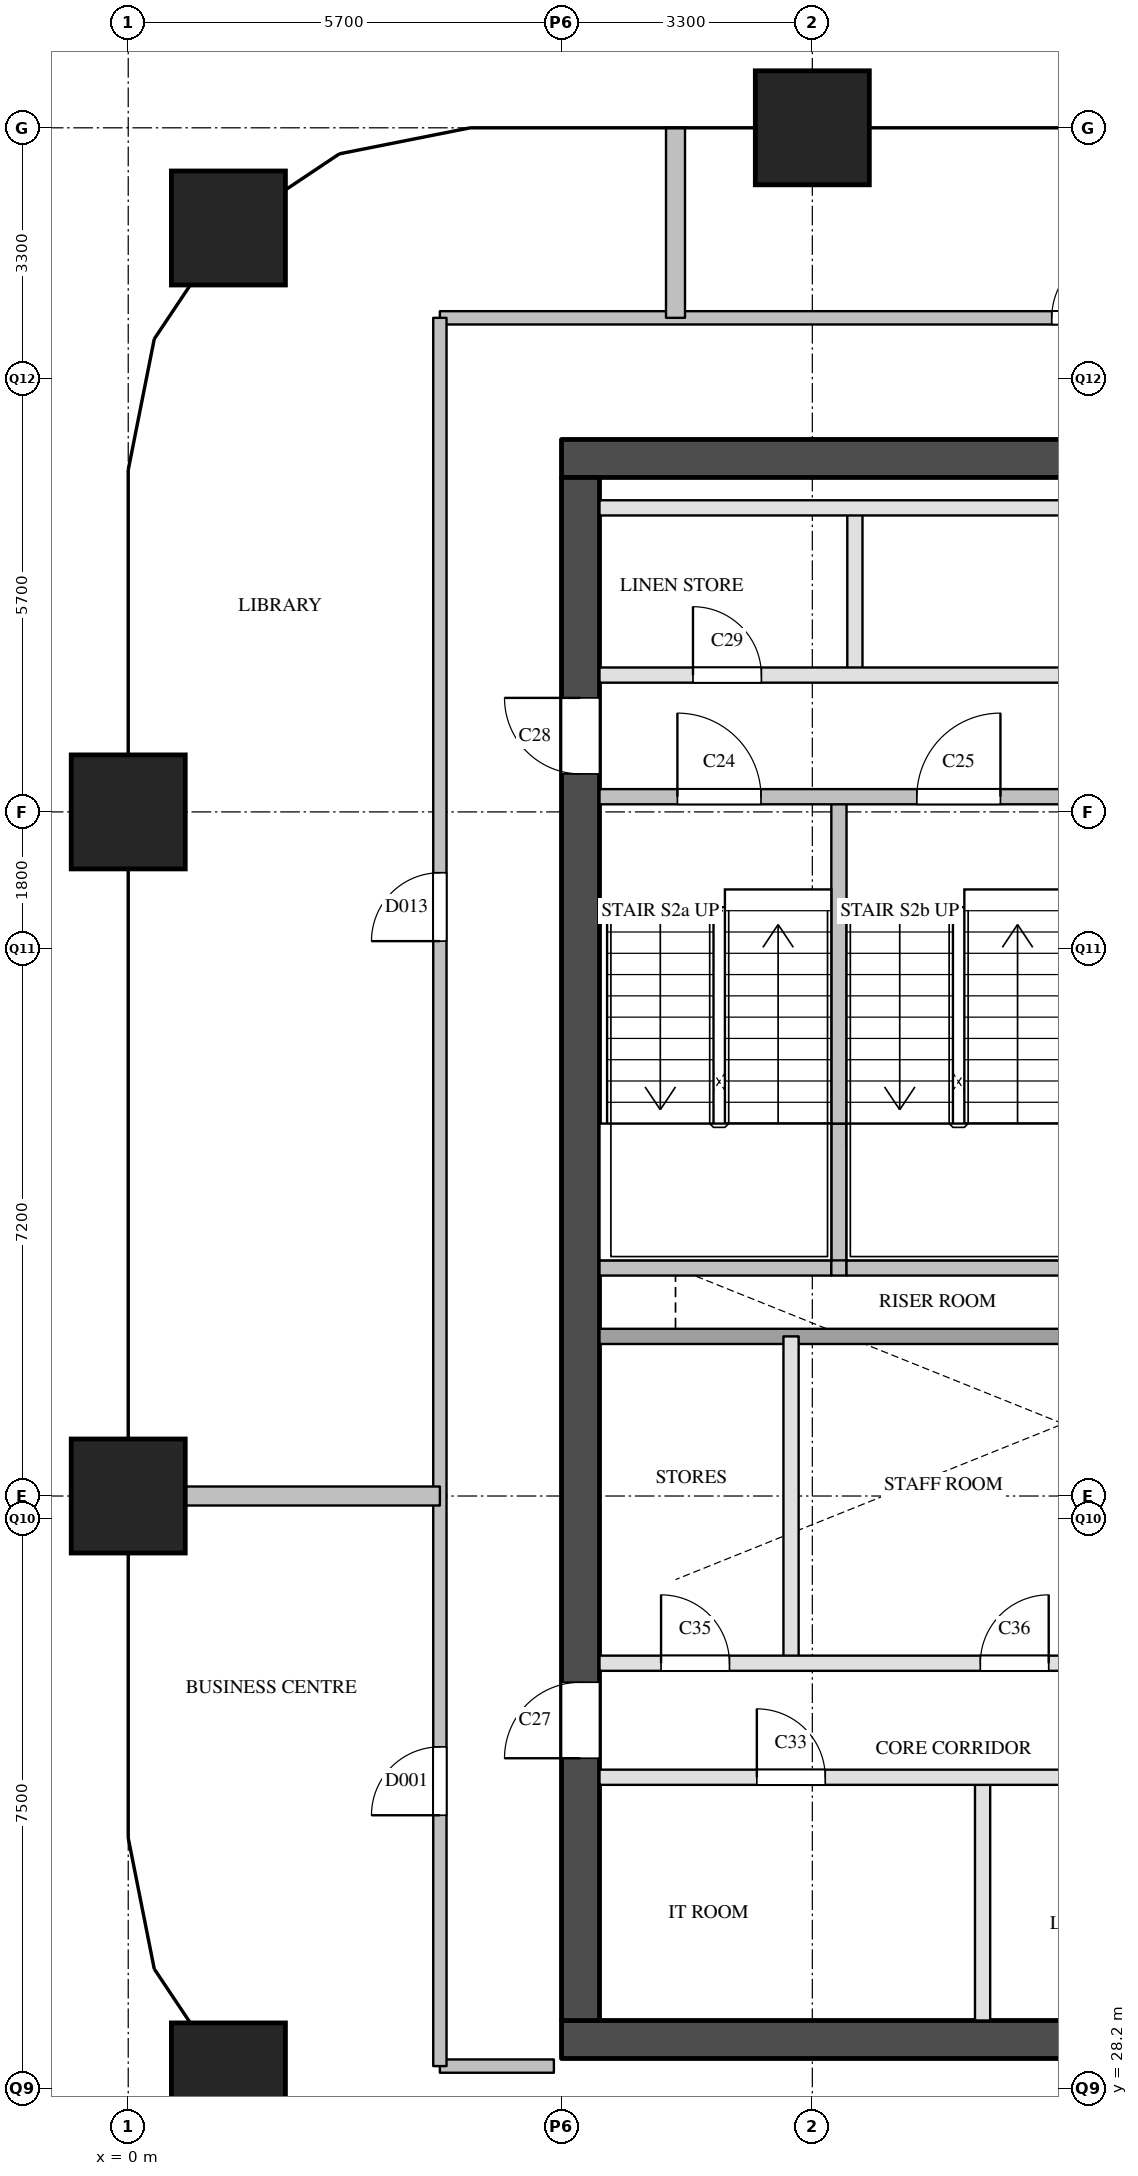
"""IFC4 building model, lengths in metres.
Left out: names, types, materials, properties, quantities, classifications, styles, units other than length and angle.
Written with IfcOpenShell. Run it as: python <this file> out.ifc"""

import sys

from ifc_helpers import new_model, si_unit, direction, frame, frame_2d, origin, origin_2d, place, context, subcontext, project, spatial, rectangle, extrude, element, fill, save


model = new_model("IFC4")
c1 = context("Model", 3, precision=1e-05, world=origin(), true_north=direction((0.0, 1.0)))
c2 = subcontext(c1, "Body", "Model", "MODEL_VIEW")
j1 = project(units=[si_unit("LENGTHUNIT", "METRE"), si_unit("PLANEANGLEUNIT", "RADIAN")], contexts=[c1])
p1 = place(None, origin())
s1 = spatial("IfcSite", under=j1, at=p1, CompositionType="ELEMENT")
p2 = place(p1, origin())
s2 = spatial("IfcBuilding", under=s1, at=p2, CompositionType="ELEMENT")
p3 = place(p2, frame((0.0, 0.0, 146.6)))
s3 = spatial("IfcBuildingStorey", under=s2, at=p3, CompositionType="ELEMENT", Elevation=146.6)
for number, where, z_axis, x_axis in (
    (1, (1.318, 28.318, 0.0), (0.0, 0.0, 1.0), (1.0, 0.0, 0.0)),
    (2, (0.0, 36.0, 0.0), (0.0, 0.0, 1.0), (1.0, 0.0, 0.0)),
    (3, (0.0, 45.0, 0.0), (0.0, 0.0, 1.0), (1.0, 0.0, 0.0)),
    (4, (1.318, 52.682, 0.0), (0.0, 0.0, 1.0), (1.0, 0.0, 0.0)),
    (5, (9.0, 54.0, 0.0), (0.0, 0.0, 1.0), (1.0, 0.0, 0.0)),
):
    element("IfcColumn", number, at=place(p3, frame(where, z_axis=z_axis, x_axis=x_axis)), inside=s3, PredefinedType="COLUMN", context=c2, shape_type="SweptSolid", body=[
        extrude(rectangle(XDim=1.5, YDim=1.5, at=origin_2d()), origin(), (0.0, 0.0, 1.0), 3.9),
    ])
p4 = place(p3, frame((5.7, 28.85, 0.0), z_axis=(0.0, 0.0, 1.0), x_axis=(1.0, 0.0, 0.0)))
e6 = element("IfcWall", 6, at=p4, inside=s3, PredefinedType="SHEAR", context=c2, shape_type="SweptSolid", body=[
    extrude(rectangle(XDim=12.2, YDim=0.5, at=frame_2d((6.1, 0.0))), origin(), (0.0, 0.0, 1.0), 3.6),
])
p5 = place(p4, frame((9.35, 0.0, 0.0)))
e7 = element("IfcOpeningElement", 7, at=p5, cuts=e6, PredefinedType="OPENING", context=c2, shape_type="SweptSolid", body=[
    extrude(rectangle(XDim=1.2, YDim=2.1, at=frame_2d((0.6, 1.05))), frame((0.0, 0.26, 0.0), z_axis=(0.0, -1.0, 0.0), x_axis=(1.0, 0.0, 0.0)), (0.0, 0.0, 1.0), 0.52),
])
p6 = place(p3, frame((5.7, 49.65, 0.0), z_axis=(0.0, 0.0, 1.0), x_axis=(1.0, 0.0, 0.0)))
e8 = element("IfcWall", 8, at=p6, inside=s3, PredefinedType="SHEAR", context=c2, shape_type="SweptSolid", body=[
    extrude(rectangle(XDim=12.2, YDim=0.5, at=frame_2d((6.1, 0.0))), origin(), (0.0, 0.0, 1.0), 3.6),
])
p7 = place(p3, frame((5.95, 29.1, 0.0), z_axis=(0.0, 0.0, 1.0), x_axis=(0.0, 1.0, 0.0)))
e9 = element("IfcWall", 9, at=p7, inside=s3, PredefinedType="SHEAR", context=c2, shape_type="SweptSolid", body=[
    extrude(rectangle(XDim=20.3, YDim=0.5, at=frame_2d((10.15, 0.0))), origin(), (0.0, 0.0, 1.0), 3.6),
])
p8 = place(p7, frame((3.45, 0.0, 0.0)))
e10 = element("IfcOpeningElement", 10, at=p8, cuts=e9, PredefinedType="OPENING", context=c2, shape_type="SweptSolid", body=[
    extrude(rectangle(XDim=1.0, YDim=2.1, at=frame_2d((0.5, 1.05))), frame((0.0, 0.26, 0.0), z_axis=(0.0, -1.0, 0.0), x_axis=(1.0, 0.0, 0.0)), (0.0, 0.0, 1.0), 0.52),
])
p9 = place(p7, frame((16.4, 0.0, 0.0)))
e11 = element("IfcOpeningElement", 11, at=p9, cuts=e9, PredefinedType="OPENING", context=c2, shape_type="SweptSolid", body=[
    extrude(rectangle(XDim=1.0, YDim=2.1, at=frame_2d((0.5, 1.05))), frame((0.0, 0.26, 0.0), z_axis=(0.0, -1.0, 0.0), x_axis=(1.0, 0.0, 0.0)), (0.0, 0.0, 1.0), 0.52),
])
p10 = place(p3, frame((8.72, 33.8, 0.0), z_axis=(0.0, 0.0, 1.0), x_axis=(0.0, 1.0, 0.0)))
e12 = element("IfcWall", 12, at=p10, inside=s3, PredefinedType="PARTITIONING", context=c2, shape_type="SweptSolid", body=[
    extrude(rectangle(XDim=4.3, YDim=0.2, at=frame_2d((2.15, 0.0))), origin(), (0.0, 0.0, 1.0), 3.6),
])
p11 = place(p3, frame((9.35, 39.0, 0.0), z_axis=(0.0, 0.0, 1.0), x_axis=(0.0, 1.0, 0.0)))
e13 = element("IfcWall", 13, at=p11, inside=s3, PredefinedType="SOLIDWALL", context=c2, shape_type="SweptSolid", body=[
    extrude(rectangle(XDim=1.9, YDim=0.2, at=frame_2d((0.95, 0.0))), origin(), (0.0, 0.0, 1.0), 3.6),
])
p12 = place(p3, frame((9.35, 40.9, 0.0), z_axis=(0.0, 0.0, 1.0), x_axis=(0.0, 1.0, 0.0)))
e14 = element("IfcWall", 14, at=p12, inside=s3, PredefinedType="SOLIDWALL", context=c2, shape_type="SweptSolid", body=[
    extrude(rectangle(XDim=4.3, YDim=0.2, at=frame_2d((2.15, 0.0))), origin(), (0.0, 0.0, 1.0), 3.6),
])
p13 = place(p3, frame((9.56, 46.8, 0.0), z_axis=(0.0, 0.0, 1.0), x_axis=(0.0, 1.0, 0.0)))
e15 = element("IfcWall", 15, at=p13, inside=s3, PredefinedType="PARTITIONING", context=c2, shape_type="SweptSolid", body=[
    extrude(rectangle(XDim=2.2, YDim=0.2, at=frame_2d((1.1, 0.0))), origin(), (0.0, 0.0, 1.0), 3.6),
])
p14 = place(p3, frame((11.24, 29.1, 0.0), z_axis=(0.0, 0.0, 1.0), x_axis=(0.0, 1.0, 0.0)))
e16 = element("IfcWall", 16, at=p14, inside=s3, PredefinedType="PARTITIONING", context=c2, shape_type="SweptSolid", body=[
    extrude(rectangle(XDim=3.2, YDim=0.2, at=frame_2d((1.6, 0.0))), origin(), (0.0, 0.0, 1.0), 3.6),
])
p15 = place(p3, frame((6.2, 32.3, 0.0), z_axis=(0.0, 0.0, 1.0), x_axis=(1.0, 0.0, 0.0)))
e17 = element("IfcWall", 17, at=p15, inside=s3, PredefinedType="PARTITIONING", context=c2, shape_type="SweptSolid", body=[
    extrude(rectangle(XDim=8.4, YDim=0.2, at=frame_2d((4.2, 0.0))), origin(), (0.0, 0.0, 1.0), 3.6),
])
p16 = place(p15, frame((2.07, 0.0, 0.0)))
e18 = element("IfcOpeningElement", 18, at=p16, cuts=e17, PredefinedType="OPENING", context=c2, shape_type="SweptSolid", body=[
    extrude(rectangle(XDim=0.9, YDim=2.1, at=frame_2d((0.45, 1.05))), frame((0.0, 0.11, 0.0), z_axis=(0.0, -1.0, 0.0), x_axis=(1.0, 0.0, 0.0)), (0.0, 0.0, 1.0), 0.22),
])
p17 = place(p15, frame((6.27, 0.0, 0.0)))
e19 = element("IfcOpeningElement", 19, at=p17, cuts=e17, PredefinedType="OPENING", context=c2, shape_type="SweptSolid", body=[
    extrude(rectangle(XDim=0.9, YDim=2.1, at=frame_2d((0.45, 1.05))), frame((0.0, 0.11, 0.0), z_axis=(0.0, -1.0, 0.0), x_axis=(1.0, 0.0, 0.0)), (0.0, 0.0, 1.0), 0.22),
])
p18 = place(p3, frame((6.2, 33.8, 0.0), z_axis=(0.0, 0.0, 1.0), x_axis=(1.0, 0.0, 0.0)))
e20 = element("IfcWall", 20, at=p18, inside=s3, PredefinedType="PARTITIONING", context=c2, shape_type="SweptSolid", body=[
    extrude(rectangle(XDim=8.4, YDim=0.2, at=frame_2d((4.2, 0.0))), origin(), (0.0, 0.0, 1.0), 3.6),
])
p19 = place(p18, frame((0.81, 0.0, 0.0)))
e21 = element("IfcOpeningElement", 21, at=p19, cuts=e20, PredefinedType="OPENING", context=c2, shape_type="SweptSolid", body=[
    extrude(rectangle(XDim=0.9, YDim=2.1, at=frame_2d((0.45, 1.05))), frame((0.0, 0.11, 0.0), z_axis=(0.0, -1.0, 0.0), x_axis=(1.0, 0.0, 0.0)), (0.0, 0.0, 1.0), 0.22),
])
p20 = place(p18, frame((5.01, 0.0, 0.0)))
e22 = element("IfcOpeningElement", 22, at=p20, cuts=e20, PredefinedType="OPENING", context=c2, shape_type="SweptSolid", body=[
    extrude(rectangle(XDim=0.9, YDim=2.1, at=frame_2d((0.45, 1.05))), frame((0.0, 0.11, 0.0), z_axis=(0.0, -1.0, 0.0), x_axis=(1.0, 0.0, 0.0)), (0.0, 0.0, 1.0), 0.22),
])
p21 = place(p3, frame((6.2, 38.1, 0.0), z_axis=(0.0, 0.0, 1.0), x_axis=(1.0, 0.0, 0.0)))
e23 = element("IfcWall", 23, at=p21, inside=s3, PredefinedType="SOLIDWALL", context=c2, shape_type="SweptSolid", body=[
    extrude(rectangle(XDim=11.2, YDim=0.2, at=frame_2d((5.6, 0.0))), origin(), (0.0, 0.0, 1.0), 3.6),
])
p22 = place(p21, frame((8.85, 0.0, 0.0)))
e24 = element("IfcOpeningElement", 24, at=p22, cuts=e23, PredefinedType="OPENING", context=c2, shape_type="SweptSolid", body=[
    extrude(rectangle(XDim=1.2, YDim=2.1, at=frame_2d((0.6, 1.05))), frame((0.0, 0.11, 0.0), z_axis=(0.0, -1.0, 0.0), x_axis=(1.0, 0.0, 0.0)), (0.0, 0.0, 1.0), 0.22),
])
p23 = place(p3, frame((6.2, 39.0, 0.0), z_axis=(0.0, 0.0, 1.0), x_axis=(1.0, 0.0, 0.0)))
e25 = element("IfcWall", 25, at=p23, inside=s3, PredefinedType="SOLIDWALL", context=c2, shape_type="SweptSolid", body=[
    extrude(rectangle(XDim=3.05, YDim=0.2, at=frame_2d((1.525, 0.0))), origin(), (0.0, 0.0, 1.0), 3.6),
])
p24 = place(p3, frame((9.25, 39.0, 0.0), z_axis=(0.0, 0.0, 1.0), x_axis=(1.0, 0.0, 0.0)))
e26 = element("IfcWall", 26, at=p24, inside=s3, PredefinedType="SOLIDWALL", context=c2, shape_type="SweptSolid", body=[
    extrude(rectangle(XDim=0.2, YDim=0.2, at=frame_2d((0.1, 0.0))), origin(), (0.0, 0.0, 1.0), 3.6),
])
p25 = place(p3, frame((9.45, 39.0, 0.0), z_axis=(0.0, 0.0, 1.0), x_axis=(1.0, 0.0, 0.0)))
e27 = element("IfcWall", 27, at=p25, inside=s3, PredefinedType="SOLIDWALL", context=c2, shape_type="SweptSolid", body=[
    extrude(rectangle(XDim=3.05, YDim=0.2, at=frame_2d((1.525, 0.0))), origin(), (0.0, 0.0, 1.0), 3.6),
])
p26 = place(p3, frame((6.2, 45.2, 0.0), z_axis=(0.0, 0.0, 1.0), x_axis=(1.0, 0.0, 0.0)))
e28 = element("IfcWall", 28, at=p26, inside=s3, PredefinedType="SOLIDWALL", context=c2, shape_type="SweptSolid", body=[
    extrude(rectangle(XDim=6.3, YDim=0.2, at=frame_2d((3.15, 0.0))), origin(), (0.0, 0.0, 1.0), 3.6),
])
p27 = place(p26, frame((1.025, 0.0, 0.0)))
e29 = element("IfcOpeningElement", 29, at=p27, cuts=e28, PredefinedType="OPENING", context=c2, shape_type="SweptSolid", body=[
    extrude(rectangle(XDim=1.1, YDim=2.1, at=frame_2d((0.55, 1.05))), frame((0.0, 0.11, 0.0), z_axis=(0.0, -1.0, 0.0), x_axis=(1.0, 0.0, 0.0)), (0.0, 0.0, 1.0), 0.22),
])
p28 = place(p26, frame((4.175, 0.0, 0.0)))
e30 = element("IfcOpeningElement", 30, at=p28, cuts=e28, PredefinedType="OPENING", context=c2, shape_type="SweptSolid", body=[
    extrude(rectangle(XDim=1.1, YDim=2.1, at=frame_2d((0.55, 1.05))), frame((0.0, 0.11, 0.0), z_axis=(0.0, -1.0, 0.0), x_axis=(1.0, 0.0, 0.0)), (0.0, 0.0, 1.0), 0.22),
])
p29 = place(p3, frame((6.2, 46.8, 0.0), z_axis=(0.0, 0.0, 1.0), x_axis=(1.0, 0.0, 0.0)))
e31 = element("IfcWall", 31, at=p29, inside=s3, PredefinedType="PARTITIONING", context=c2, shape_type="SweptSolid", body=[
    extrude(rectangle(XDim=11.2, YDim=0.2, at=frame_2d((5.6, 0.0))), origin(), (0.0, 0.0, 1.0), 3.6),
])
p30 = place(p29, frame((1.23, 0.0, 0.0)))
e32 = element("IfcOpeningElement", 32, at=p30, cuts=e31, PredefinedType="OPENING", context=c2, shape_type="SweptSolid", body=[
    extrude(rectangle(XDim=0.9, YDim=2.1, at=frame_2d((0.45, 1.05))), frame((0.0, 0.11, 0.0), z_axis=(0.0, -1.0, 0.0), x_axis=(1.0, 0.0, 0.0)), (0.0, 0.0, 1.0), 0.22),
])
p31 = place(p29, frame((6.83, 0.0, 0.0)))
e33 = element("IfcOpeningElement", 33, at=p31, cuts=e31, PredefinedType="OPENING", context=c2, shape_type="SweptSolid", body=[
    extrude(rectangle(XDim=0.9, YDim=2.1, at=frame_2d((0.45, 1.05))), frame((0.0, 0.11, 0.0), z_axis=(0.0, -1.0, 0.0), x_axis=(1.0, 0.0, 0.0)), (0.0, 0.0, 1.0), 0.22),
])
p32 = place(p3, frame((6.2, 49.0, 0.0), z_axis=(0.0, 0.0, 1.0), x_axis=(1.0, 0.0, 0.0)))
e34 = element("IfcWall", 34, at=p32, inside=s3, PredefinedType="PARTITIONING", context=c2, shape_type="SweptSolid", body=[
    extrude(rectangle(XDim=11.2, YDim=0.2, at=frame_2d((5.6, 0.0))), origin(), (0.0, 0.0, 1.0), 3.6),
])
p33 = place(p3, frame((4.1, 28.5, 0.0), z_axis=(0.0, 0.0, 1.0), x_axis=(1.0, 0.0, 0.0)))
e35 = element("IfcWall", 35, at=p33, inside=s3, PredefinedType="PARTITIONING", context=c2, shape_type="SweptSolid", body=[
    extrude(rectangle(XDim=1.5, YDim=0.175, at=frame_2d((0.75, 0.0))), origin(), (0.0, 0.0, 1.0), 3.6),
])
p34 = place(p3, frame((4.1, 51.5, 0.0), z_axis=(0.0, 0.0, 1.0), x_axis=(1.0, 0.0, 0.0)))
e36 = element("IfcWall", 36, at=p34, inside=s3, PredefinedType="PARTITIONING", context=c2, shape_type="SweptSolid", body=[
    extrude(rectangle(XDim=15.4, YDim=0.175, at=frame_2d((7.7, 0.0))), origin(), (0.0, 0.0, 1.0), 3.6),
])
p35 = place(p34, frame((8.05, 0.0, 0.0)))
e37 = element("IfcOpeningElement", 37, at=p35, cuts=e36, PredefinedType="OPENING", context=c2, shape_type="SweptSolid", body=[
    extrude(rectangle(XDim=0.9, YDim=2.1, at=frame_2d((0.45, 1.05))), frame((0.0, 0.097, 0.0), z_axis=(0.0, -1.0, 0.0), x_axis=(1.0, 0.0, 0.0)), (0.0, 0.0, 1.0), 0.195),
])
p36 = place(p3, frame((4.1, 28.5, 0.0), z_axis=(0.0, 0.0, 1.0), x_axis=(0.0, 1.0, 0.0)))
e38 = element("IfcWall", 38, at=p36, inside=s3, PredefinedType="PARTITIONING", context=c2, shape_type="SweptSolid", body=[
    extrude(rectangle(XDim=23.0, YDim=0.175, at=frame_2d((11.5, 0.0))), origin(), (0.0, 0.0, 1.0), 3.6),
])
p37 = place(p36, frame((3.3, 0.0, 0.0)))
e39 = element("IfcOpeningElement", 39, at=p37, cuts=e38, PredefinedType="OPENING", context=c2, shape_type="SweptSolid", body=[
    extrude(rectangle(XDim=0.9, YDim=2.1, at=frame_2d((0.45, 1.05))), frame((0.0, 0.097, 0.0), z_axis=(0.0, -1.0, 0.0), x_axis=(1.0, 0.0, 0.0)), (0.0, 0.0, 1.0), 0.195),
])
p38 = place(p36, frame((14.8, 0.0, 0.0)))
e40 = element("IfcOpeningElement", 40, at=p38, cuts=e38, PredefinedType="OPENING", context=c2, shape_type="SweptSolid", body=[
    extrude(rectangle(XDim=0.9, YDim=2.1, at=frame_2d((0.45, 1.05))), frame((0.0, 0.097, 0.0), z_axis=(0.0, -1.0, 0.0), x_axis=(1.0, 0.0, 0.0)), (0.0, 0.0, 1.0), 0.195),
])
p39 = place(p3, frame((0.0, 36.0, 0.0), z_axis=(0.0, 0.0, 1.0), x_axis=(1.0, 0.0, 0.0)))
e41 = element("IfcWall", 41, at=p39, inside=s3, PredefinedType="PARTITIONING", context=c2, shape_type="SweptSolid", body=[
    extrude(rectangle(XDim=4.1, YDim=0.25, at=frame_2d((2.05, 0.0))), origin(), (0.0, 0.0, 1.0), 3.6),
])
p40 = place(p3, frame((7.2, 51.5, 0.0), z_axis=(0.0, 0.0, 1.0), x_axis=(0.0, 1.0, 0.0)))
e42 = element("IfcWall", 42, at=p40, inside=s3, PredefinedType="PARTITIONING", context=c2, shape_type="SweptSolid", body=[
    extrude(rectangle(XDim=2.5, YDim=0.25, at=frame_2d((1.25, 0.0))), origin(), (0.0, 0.0, 1.0), 2.6),
])
p41 = place(p27, origin())
e43 = element("IfcDoor", 43, at=p41, inside=s3, OperationType="SINGLE_SWING_LEFT", PredefinedType="DOOR", context=c2, shape_type="SweptSolid", body=[
    extrude(rectangle(XDim=1.1, YDim=2.1, at=frame_2d((0.55, 1.05))), frame((0.0, 0.025, 0.0), z_axis=(0.0, -1.0, 0.0), x_axis=(1.0, 0.0, 0.0)), (0.0, 0.0, 1.0), 0.05),
])
fill(e29, e43)
p42 = place(p28, origin())
e44 = element("IfcDoor", 44, at=p42, inside=s3, OperationType="SINGLE_SWING_RIGHT", PredefinedType="DOOR", context=c2, shape_type="SweptSolid", body=[
    extrude(rectangle(XDim=1.1, YDim=2.1, at=frame_2d((0.55, 1.05))), frame((0.0, 0.025, 0.0), z_axis=(0.0, -1.0, 0.0), x_axis=(1.0, 0.0, 0.0)), (0.0, 0.0, 1.0), 0.05),
])
fill(e30, e44)
p43 = place(p8, origin())
e45 = element("IfcDoor", 45, at=p43, inside=s3, OperationType="SINGLE_SWING_LEFT", PredefinedType="DOOR", context=c2, shape_type="SweptSolid", body=[
    extrude(rectangle(XDim=1.0, YDim=2.1, at=frame_2d((0.5, 1.05))), frame((0.0, 0.025, 0.0), z_axis=(0.0, -1.0, 0.0), x_axis=(1.0, 0.0, 0.0)), (0.0, 0.0, 1.0), 0.05),
])
fill(e10, e45)
p44 = place(p9, origin())
e46 = element("IfcDoor", 46, at=p44, inside=s3, OperationType="SINGLE_SWING_RIGHT", PredefinedType="DOOR", context=c2, shape_type="SweptSolid", body=[
    extrude(rectangle(XDim=1.0, YDim=2.1, at=frame_2d((0.5, 1.05))), frame((0.0, 0.025, 0.0), z_axis=(0.0, -1.0, 0.0), x_axis=(1.0, 0.0, 0.0)), (0.0, 0.0, 1.0), 0.05),
])
fill(e11, e46)
p45 = place(p30, origin())
e47 = element("IfcDoor", 47, at=p45, inside=s3, OperationType="SINGLE_SWING_LEFT", PredefinedType="DOOR", context=c2, shape_type="SweptSolid", body=[
    extrude(rectangle(XDim=0.9, YDim=2.1, at=frame_2d((0.45, 1.05))), frame((0.0, 0.025, 0.0), z_axis=(0.0, -1.0, 0.0), x_axis=(1.0, 0.0, 0.0)), (0.0, 0.0, 1.0), 0.05),
])
fill(e32, e47)
p46 = place(p16, origin())
e48 = element("IfcDoor", 48, at=p46, inside=s3, OperationType="SINGLE_SWING_LEFT", PredefinedType="DOOR", context=c2, shape_type="SweptSolid", body=[
    extrude(rectangle(XDim=0.9, YDim=2.1, at=frame_2d((0.45, 1.05))), frame((0.0, 0.025, 0.0), z_axis=(0.0, -1.0, 0.0), x_axis=(1.0, 0.0, 0.0)), (0.0, 0.0, 1.0), 0.05),
])
fill(e18, e48)
p47 = place(p19, origin())
e49 = element("IfcDoor", 49, at=p47, inside=s3, OperationType="SINGLE_SWING_LEFT", PredefinedType="DOOR", context=c2, shape_type="SweptSolid", body=[
    extrude(rectangle(XDim=0.9, YDim=2.1, at=frame_2d((0.45, 1.05))), frame((0.0, 0.025, 0.0), z_axis=(0.0, -1.0, 0.0), x_axis=(1.0, 0.0, 0.0)), (0.0, 0.0, 1.0), 0.05),
])
fill(e21, e49)
p48 = place(p20, origin())
e50 = element("IfcDoor", 50, at=p48, inside=s3, OperationType="SINGLE_SWING_RIGHT", PredefinedType="DOOR", context=c2, shape_type="SweptSolid", body=[
    extrude(rectangle(XDim=0.9, YDim=2.1, at=frame_2d((0.45, 1.05))), frame((0.0, 0.025, 0.0), z_axis=(0.0, -1.0, 0.0), x_axis=(1.0, 0.0, 0.0)), (0.0, 0.0, 1.0), 0.05),
])
fill(e22, e50)
p49 = place(p37, origin())
e51 = element("IfcDoor", 51, at=p49, inside=s3, OperationType="SINGLE_SWING_LEFT", PredefinedType="DOOR", context=c2, shape_type="SweptSolid", body=[
    extrude(rectangle(XDim=0.9, YDim=2.1, at=frame_2d((0.45, 1.05))), frame((0.0, 0.025, 0.0), z_axis=(0.0, -1.0, 0.0), x_axis=(1.0, 0.0, 0.0)), (0.0, 0.0, 1.0), 0.05),
])
fill(e39, e51)
p50 = place(p38, origin())
e52 = element("IfcDoor", 52, at=p50, inside=s3, OperationType="SINGLE_SWING_LEFT", PredefinedType="DOOR", context=c2, shape_type="SweptSolid", body=[
    extrude(rectangle(XDim=0.9, YDim=2.1, at=frame_2d((0.45, 1.05))), frame((0.0, 0.025, 0.0), z_axis=(0.0, -1.0, 0.0), x_axis=(1.0, 0.0, 0.0)), (0.0, 0.0, 1.0), 0.05),
])
fill(e40, e52)
p51 = place(p35, origin())
e53 = element("IfcDoor", 53, at=p51, inside=s3, OperationType="SINGLE_SWING_RIGHT", PredefinedType="DOOR", context=c2, shape_type="SweptSolid", body=[
    extrude(rectangle(XDim=0.9, YDim=2.1, at=frame_2d((0.45, 1.05))), frame((0.0, 0.025, 0.0), z_axis=(0.0, -1.0, 0.0), x_axis=(1.0, 0.0, 0.0)), (0.0, 0.0, 1.0), 0.05),
])
fill(e37, e53)
save(model, sys.argv[1])
